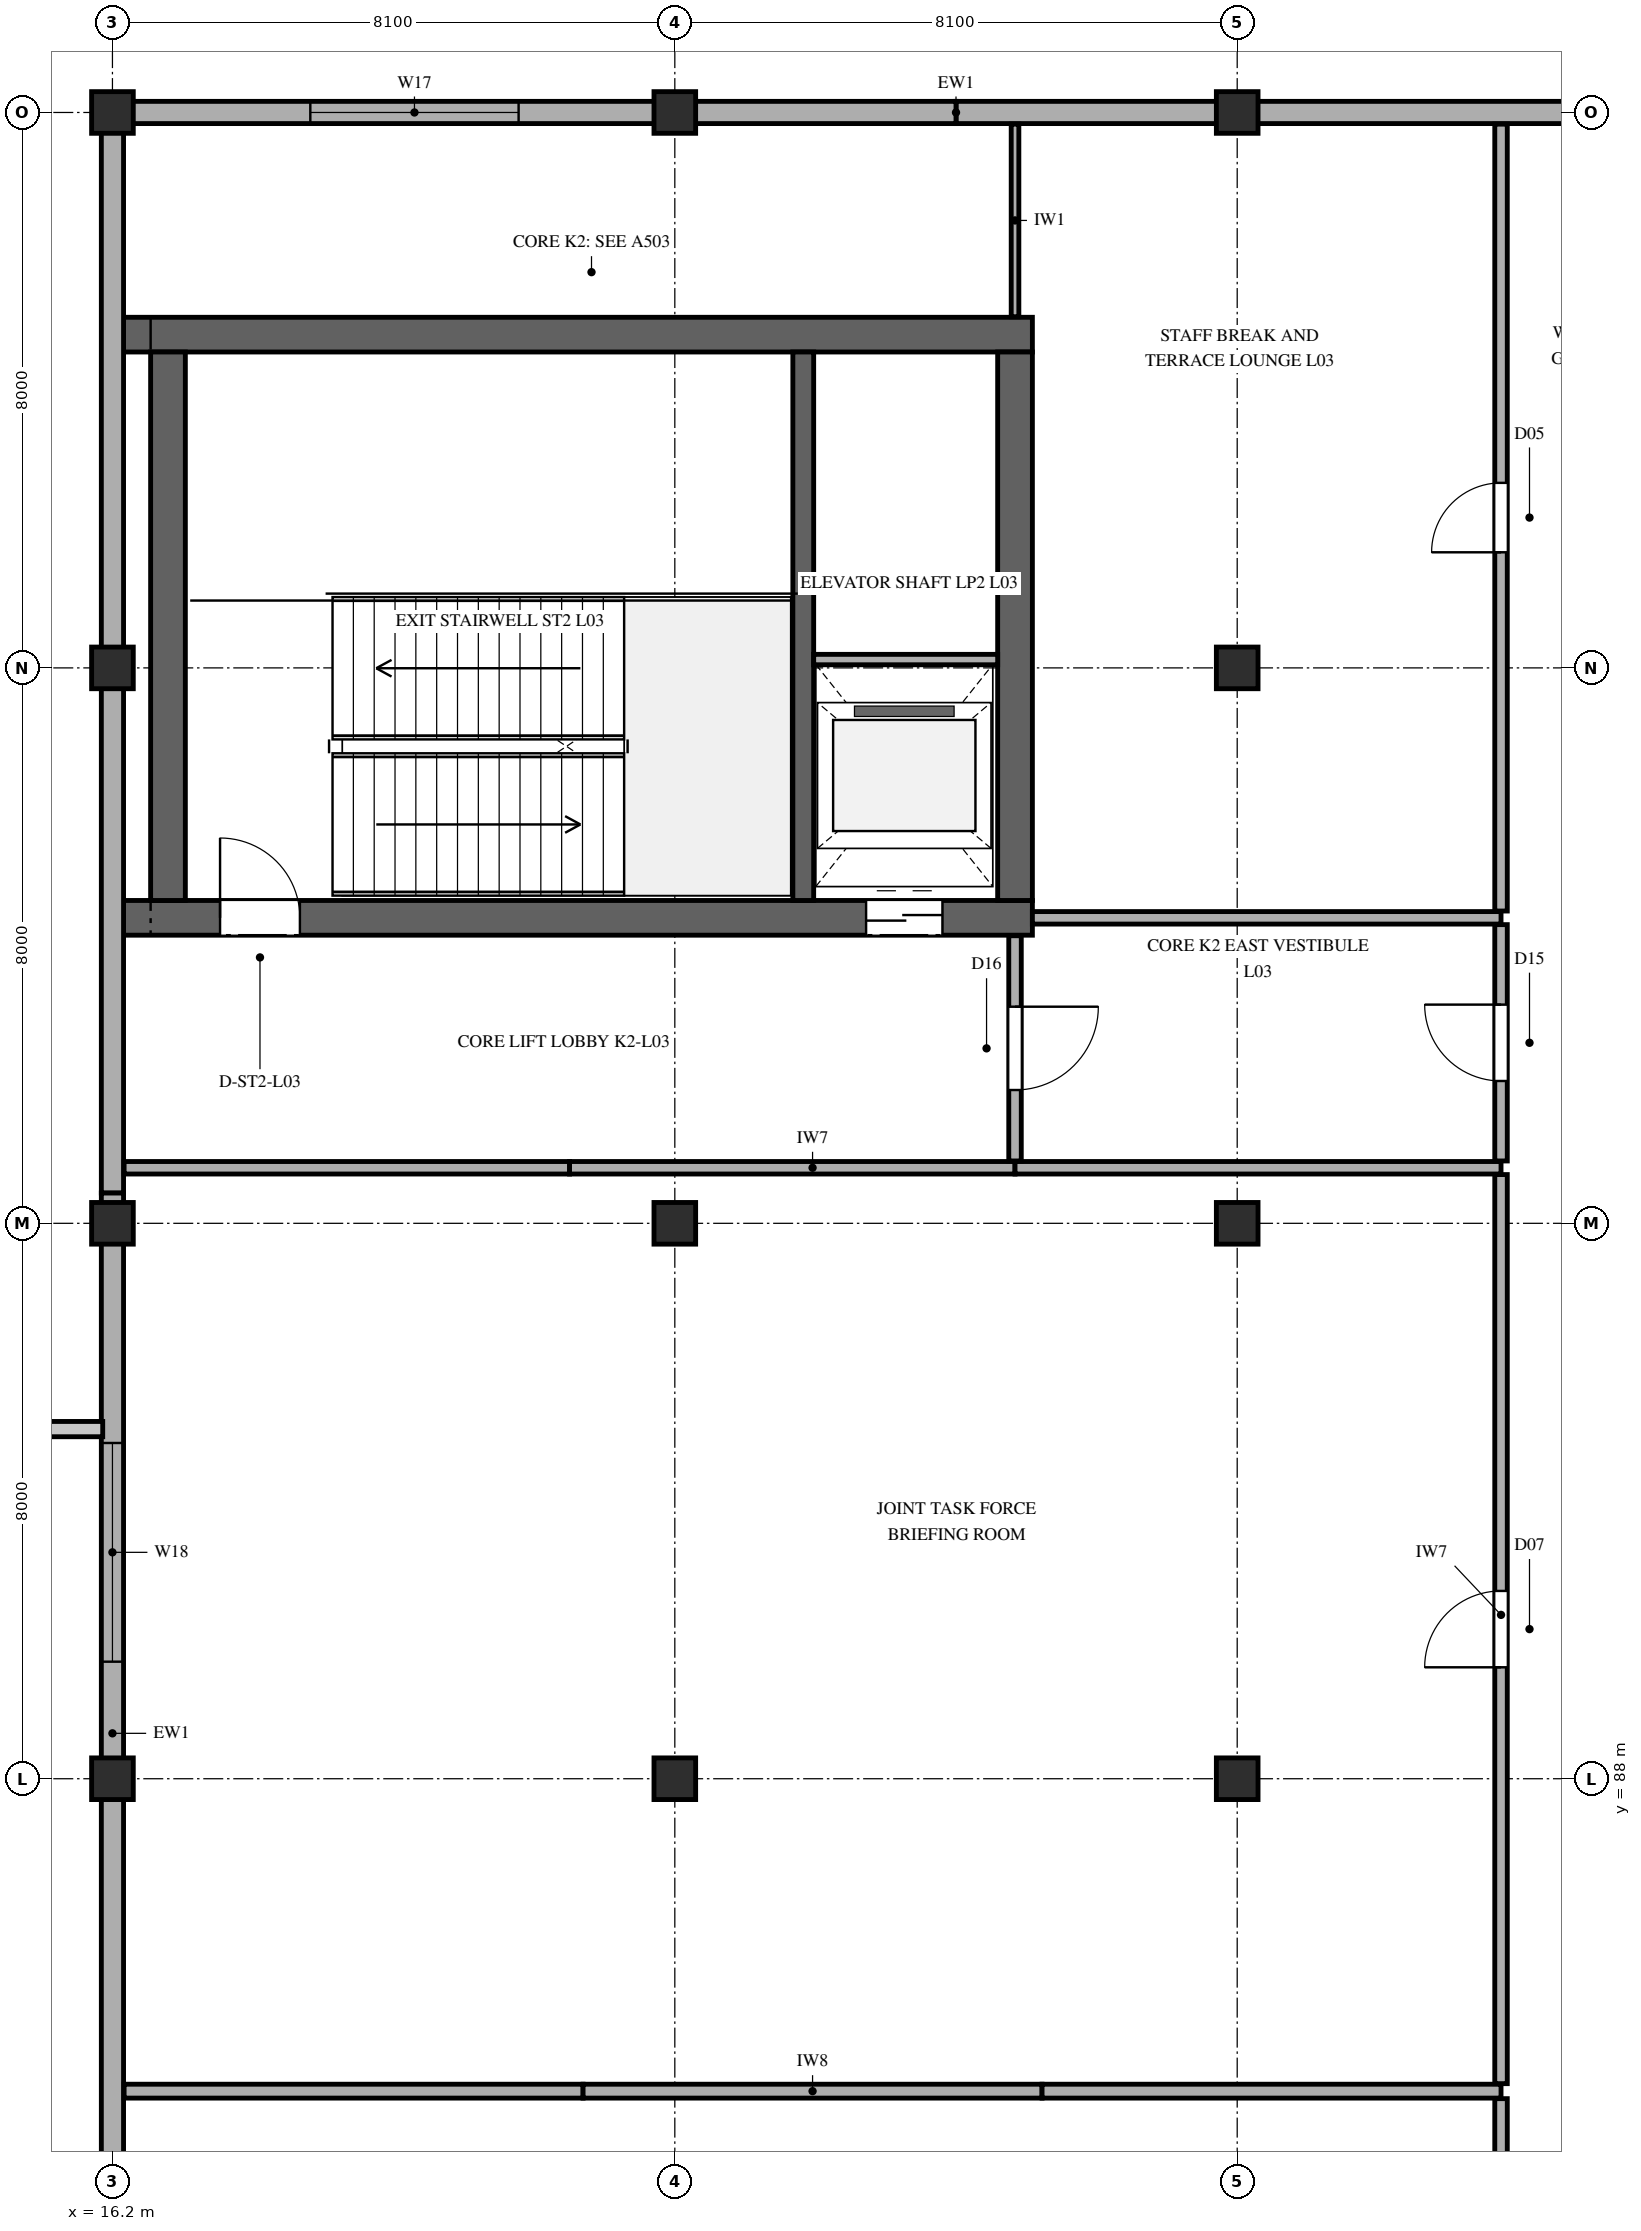
"""IFC4 building model, lengths in metres.
Left out: names, types, materials, properties, quantities, classifications, styles, units other than length and angle.
Written with IfcOpenShell. Run it as: python <this file> out.ifc"""

import sys

from ifc_helpers import new_model, si_unit, direction, frame, frame_2d, origin, origin_2d, place, context, subcontext, project, spatial, rectangle, extrude, element, fill, save


model = new_model("IFC4")
c1 = context("Model", 3, precision=1e-05, world=origin(), true_north=direction((0.0, 1.0)))
c2 = subcontext(c1, "Body", "Model", "MODEL_VIEW")
j1 = project(units=[si_unit("LENGTHUNIT", "METRE"), si_unit("PLANEANGLEUNIT", "RADIAN")], contexts=[c1])
p1 = place(None, origin())
s1 = spatial("IfcSite", under=j1, at=p1, CompositionType="ELEMENT")
p2 = place(p1, origin())
s2 = spatial("IfcBuilding", under=s1, at=p2, CompositionType="ELEMENT")
p3 = place(p2, frame((0.0, 0.0, 14.7)))
s3 = spatial("IfcBuildingStorey", under=s2, at=p3, CompositionType="ELEMENT", Elevation=14.7)
p4 = place(p3, frame((16.36, 100.4, 0.0), z_axis=(0.0, 0.0, 1.0), x_axis=(1.0, 0.0, 0.0)))
e1 = element("IfcWall", 1, at=p4, inside=s3, PredefinedType="SHEAR", context=c2, shape_type="SweptSolid", body=[
    extrude(rectangle(XDim=13.09, YDim=0.5, at=frame_2d((6.545, 0.0))), origin(), (0.0, 0.0, 1.0), 5.1),
])
p5 = place(p4, frame((1.39, 0.0, 0.0)))
e2 = element("IfcOpeningElement", 2, at=p5, cuts=e1, PredefinedType="OPENING", context=c2, shape_type="SweptSolid", body=[
    extrude(rectangle(XDim=1.15, YDim=2.25, at=frame_2d((0.575, 1.125))), frame((0.0, 0.26, 0.0), z_axis=(0.0, -1.0, 0.0), x_axis=(1.0, 0.0, 0.0)), (0.0, 0.0, 1.0), 0.52),
])
p6 = place(p4, frame((10.695, 0.0, 0.0)))
e3 = element("IfcOpeningElement", 3, at=p6, cuts=e1, PredefinedType="OPENING", context=c2, shape_type="SweptSolid", body=[
    extrude(rectangle(XDim=1.1, YDim=2.2, at=frame_2d((0.55, 1.1))), frame((0.0, 0.26, 0.0), z_axis=(0.0, -1.0, 0.0), x_axis=(1.0, 0.0, 0.0)), (0.0, 0.0, 1.0), 0.52),
])
p7 = place(p3, frame((16.36, 108.8, 0.0), z_axis=(0.0, 0.0, 1.0), x_axis=(1.0, 0.0, 0.0)))
e4 = element("IfcWall", 4, at=p7, inside=s3, PredefinedType="SHEAR", context=c2, shape_type="SweptSolid", body=[
    extrude(rectangle(XDim=13.09, YDim=0.5, at=frame_2d((6.545, 0.0))), origin(), (0.0, 0.0, 1.0), 5.1),
])
for number, where, z_axis, x_axis in (
    (5, (17.0, 100.65, 0.0), (0.0, 0.0, 1.0), (0.0, 1.0, 0.0)),
    (6, (29.2, 100.65, 0.0), (0.0, 0.0, 1.0), (0.0, 1.0, 0.0)),
):
    element("IfcWall", number, at=place(p3, frame(where, z_axis=z_axis, x_axis=x_axis)), inside=s3, PredefinedType="SHEAR", context=c2, shape_type="SweptSolid", body=[
        extrude(rectangle(XDim=7.9, YDim=0.5, at=frame_2d((3.95, 0.0))), origin(), (0.0, 0.0, 1.0), 5.1),
    ])
p8 = place(p3, frame((26.15, 100.65, 0.0), z_axis=(0.0, 0.0, 1.0), x_axis=(0.0, 1.0, 0.0)))
e7 = element("IfcWall", 7, at=p8, inside=s3, PredefinedType="SHEAR", context=c2, shape_type="SweptSolid", body=[
    extrude(rectangle(XDim=7.9, YDim=0.3, at=frame_2d((3.95, 0.0))), origin(), (0.0, 0.0, 1.0), 5.1),
])
for number, where, z_axis, x_axis in (
    (8, (16.2, 88.0, 0.0), (0.0, 0.0, 1.0), (1.0, 0.0, 0.0)),
    (9, (16.2, 96.0, 0.0), (0.0, 0.0, 1.0), (1.0, 0.0, 0.0)),
    (10, (16.2, 104.0, 0.0), (0.0, 0.0, 1.0), (1.0, 0.0, 0.0)),
    (11, (16.2, 112.0, 0.0), (0.0, 0.0, 1.0), (1.0, 0.0, 0.0)),
    (12, (24.3, 88.0, 0.0), (0.0, 0.0, 1.0), (1.0, 0.0, 0.0)),
    (13, (24.3, 96.0, 0.0), (0.0, 0.0, 1.0), (1.0, 0.0, 0.0)),
    (14, (24.3, 112.0, 0.0), (0.0, 0.0, 1.0), (1.0, 0.0, 0.0)),
    (15, (32.4, 88.0, 0.0), (0.0, 0.0, 1.0), (1.0, 0.0, 0.0)),
    (16, (32.4, 96.0, 0.0), (0.0, 0.0, 1.0), (1.0, 0.0, 0.0)),
    (17, (32.4, 104.0, 0.0), (0.0, 0.0, 1.0), (1.0, 0.0, 0.0)),
    (18, (32.4, 112.0, 0.0), (0.0, 0.0, 1.0), (1.0, 0.0, 0.0)),
):
    element("IfcColumn", number, at=place(p3, frame(where, z_axis=z_axis, x_axis=x_axis)), inside=s3, PredefinedType="COLUMN", context=c2, shape_type="SweptSolid", body=[
        extrude(rectangle(XDim=0.6, YDim=0.6, at=origin_2d()), origin(), (0.0, 0.0, 1.0), 5.1),
    ])
p9 = place(p3, frame((40.5, 112.0, 0.0), z_axis=(0.0, 0.0, 1.0), x_axis=(-1.0, 0.0, 0.0)))
e19 = element("IfcWall", 19, at=p9, inside=s3, PredefinedType="SOLIDWALL", context=c2, shape_type="SweptSolid", body=[
    extrude(rectangle(XDim=12.15, YDim=0.32, at=frame_2d((6.075, 0.0))), origin(), (0.0, 0.0, 1.0), 4.232),
])
p10 = place(p3, frame((28.35, 112.0, 0.0), z_axis=(0.0, 0.0, 1.0), x_axis=(-1.0, 0.0, 0.0)))
e20 = element("IfcWall", 20, at=p10, inside=s3, PredefinedType="SOLIDWALL", context=c2, shape_type="SweptSolid", body=[
    extrude(rectangle(XDim=12.15, YDim=0.32, at=frame_2d((6.075, 0.0))), origin(), (0.0, 0.0, 1.0), 4.232),
])
p11 = place(p10, frame((6.3, 0.0, 0.95)))
e21 = element("IfcOpeningElement", 21, at=p11, cuts=e20, PredefinedType="OPENING", context=c2, shape_type="SweptSolid", body=[
    extrude(rectangle(XDim=3.0, YDim=1.8, at=frame_2d((1.5, 0.9))), frame((0.0, 0.17, 0.0), z_axis=(0.0, -1.0, 0.0), x_axis=(1.0, 0.0, 0.0)), (0.0, 0.0, 1.0), 0.34),
])
p12 = place(p3, frame((16.2, 112.0, 0.0), z_axis=(0.0, 0.0, 1.0), x_axis=(0.0, -1.0, 0.0)))
e22 = element("IfcWall", 22, at=p12, inside=s3, PredefinedType="SOLIDWALL", context=c2, shape_type="SweptSolid", body=[
    extrude(rectangle(XDim=15.564, YDim=0.32, at=frame_2d((7.782, 0.0))), origin(), (0.0, 0.0, 1.0), 4.369),
])
p13 = place(p3, frame((16.2, 96.436, 0.0), z_axis=(0.0, 0.0, 1.0), x_axis=(0.0, -1.0, 0.0)))
e23 = element("IfcWall", 23, at=p13, inside=s3, PredefinedType="SOLIDWALL", context=c2, shape_type="SweptSolid", body=[
    extrude(rectangle(XDim=15.564, YDim=0.32, at=frame_2d((7.782, 0.0))), origin(), (0.0, 0.0, 1.0), 4.332),
])
p14 = place(p13, frame((3.6, 0.0, 0.95)))
e24 = element("IfcOpeningElement", 24, at=p14, cuts=e23, PredefinedType="OPENING", context=c2, shape_type="SweptSolid", body=[
    extrude(rectangle(XDim=3.15, YDim=1.6, at=frame_2d((1.575, 0.8))), frame((0.0, 0.17, 0.0), z_axis=(0.0, -1.0, 0.0), x_axis=(1.0, 0.0, 0.0)), (0.0, 0.0, 1.0), 0.34),
])
p15 = place(p3, frame((26.3, 104.12, 0.0), z_axis=(0.0, 0.0, 1.0), x_axis=(1.0, 0.0, 0.0)))
e25 = element("IfcWall", 25, at=p15, inside=s3, PredefinedType="PARTITIONING", context=c2, shape_type="SweptSolid", body=[
    extrude(rectangle(XDim=2.65, YDim=0.15, at=frame_2d((1.325, 0.0))), origin(), (0.0, 0.0, 1.0), 4.84),
])
p16 = place(p3, frame((16.368, 83.5, 0.0), z_axis=(0.0, 0.0, 1.0), x_axis=(1.0, 0.0, 0.0)))
e26 = element("IfcWall", 26, at=p16, inside=s3, PredefinedType="PARTITIONING", context=c2, shape_type="SweptSolid", body=[
    extrude(rectangle(XDim=6.611, YDim=0.2, at=frame_2d((3.305, 0.0))), origin(), (0.0, 0.0, 1.0), 4.84),
])
for number, where, z_axis, x_axis in (
    (27, (22.979, 83.5, 0.0), (0.0, 0.0, 1.0), (1.0, 0.0, 0.0)),
    (28, (29.589, 83.5, 0.0), (0.0, 0.0, 1.0), (1.0, 0.0, 0.0)),
):
    element("IfcWall", number, at=place(p3, frame(where, z_axis=z_axis, x_axis=x_axis)), inside=s3, PredefinedType="PARTITIONING", context=c2, shape_type="SweptSolid", body=[
        extrude(rectangle(XDim=6.611, YDim=0.2, at=frame_2d((3.305, 0.0))), origin(), (0.0, 0.0, 1.0), 4.84),
    ])
for number, where, z_axis, x_axis in (
    (29, (16.368, 96.8, 0.0), (0.0, 0.0, 1.0), (1.0, 0.0, 0.0)),
    (30, (22.784, 96.8, 0.0), (0.0, 0.0, 1.0), (1.0, 0.0, 0.0)),
):
    element("IfcWall", number, at=place(p3, frame(where, z_axis=z_axis, x_axis=x_axis)), inside=s3, PredefinedType="PARTITIONING", context=c2, shape_type="SweptSolid", body=[
        extrude(rectangle(XDim=6.416, YDim=0.18, at=frame_2d((3.208, 0.0))), origin(), (0.0, 0.0, 1.0), 4.84),
    ])
p17 = place(p3, frame((29.2, 96.8, 0.0), z_axis=(0.0, 0.0, 1.0), x_axis=(1.0, 0.0, 0.0)))
e31 = element("IfcWall", 31, at=p17, inside=s3, PredefinedType="PARTITIONING", context=c2, shape_type="SweptSolid", body=[
    extrude(rectangle(XDim=7.0, YDim=0.18, at=frame_2d((3.5, 0.0))), origin(), (0.0, 0.0, 1.0), 4.84),
])
p18 = place(p3, frame((29.45, 100.4, 0.0), z_axis=(0.0, 0.0, 1.0), x_axis=(1.0, 0.0, 0.0)))
e32 = element("IfcWall", 32, at=p18, inside=s3, PredefinedType="PARTITIONING", context=c2, shape_type="SweptSolid", body=[
    extrude(rectangle(XDim=6.75, YDim=0.18, at=frame_2d((3.375, 0.0))), origin(), (0.0, 0.0, 1.0), 4.84),
])
p19 = place(p3, frame((29.2, 96.898, 0.0), z_axis=(0.0, 0.0, 1.0), x_axis=(0.0, 1.0, 0.0)))
e33 = element("IfcWall", 33, at=p19, inside=s3, PredefinedType="PARTITIONING", context=c2, shape_type="SweptSolid", body=[
    extrude(rectangle(XDim=3.244, YDim=0.18, at=frame_2d((1.622, 0.0))), origin(), (0.0, 0.0, 1.0), 4.84),
])
p20 = place(p19, frame((1.022, 0.0, 0.0)))
e34 = element("IfcOpeningElement", 34, at=p20, cuts=e33, PredefinedType="OPENING", context=c2, shape_type="SweptSolid", body=[
    extrude(rectangle(XDim=1.2, YDim=2.2, at=frame_2d((0.6, 1.1))), frame((0.0, 0.1, 0.0), z_axis=(0.0, -1.0, 0.0), x_axis=(1.0, 0.0, 0.0)), (0.0, 0.0, 1.0), 0.2),
])
p21 = place(p3, frame((29.2, 109.058, 0.0), z_axis=(0.0, 0.0, 1.0), x_axis=(0.0, 1.0, 0.0)))
e35 = element("IfcWall", 35, at=p21, inside=s3, PredefinedType="PARTITIONING", context=c2, shape_type="SweptSolid", body=[
    extrude(rectangle(XDim=2.774, YDim=0.11, at=frame_2d((1.387, 0.0))), origin(), (0.0, 0.0, 1.0), 4.84),
])
p22 = place(p3, frame((36.2, 68.888, 0.0), z_axis=(0.0, 0.0, 1.0), x_axis=(0.0, 1.0, 0.0)))
e36 = element("IfcWall", 36, at=p22, inside=s3, PredefinedType="PARTITIONING", context=c2, shape_type="SweptSolid", body=[
    extrude(rectangle(XDim=14.504, YDim=0.18, at=frame_2d((7.252, 0.0))), origin(), (0.0, 0.0, 1.0), 4.529),
])
p23 = place(p22, frame((6.702, 0.0, 0.0)))
e37 = element("IfcOpeningElement", 37, at=p23, cuts=e36, PredefinedType="OPENING", context=c2, shape_type="SweptSolid", body=[
    extrude(rectangle(XDim=1.1, YDim=2.2, at=frame_2d((0.55, 1.1))), frame((0.0, 0.1, 0.0), z_axis=(0.0, -1.0, 0.0), x_axis=(1.0, 0.0, 0.0)), (0.0, 0.0, 1.0), 0.2),
])
p24 = place(p3, frame((36.2, 83.608, 0.0), z_axis=(0.0, 0.0, 1.0), x_axis=(0.0, 1.0, 0.0)))
e38 = element("IfcWall", 38, at=p24, inside=s3, PredefinedType="PARTITIONING", context=c2, shape_type="SweptSolid", body=[
    extrude(rectangle(XDim=13.094, YDim=0.18, at=frame_2d((6.547, 0.0))), origin(), (0.0, 0.0, 1.0), 4.478),
])
p25 = place(p24, frame((5.997, 0.0, 0.0)))
e39 = element("IfcOpeningElement", 39, at=p25, cuts=e38, PredefinedType="OPENING", context=c2, shape_type="SweptSolid", body=[
    extrude(rectangle(XDim=1.1, YDim=2.2, at=frame_2d((0.55, 1.1))), frame((0.0, 0.1, 0.0), z_axis=(0.0, -1.0, 0.0), x_axis=(1.0, 0.0, 0.0)), (0.0, 0.0, 1.0), 0.2),
])
p26 = place(p3, frame((36.2, 96.898, 0.0), z_axis=(0.0, 0.0, 1.0), x_axis=(0.0, 1.0, 0.0)))
e40 = element("IfcWall", 40, at=p26, inside=s3, PredefinedType="PARTITIONING", context=c2, shape_type="SweptSolid", body=[
    extrude(rectangle(XDim=3.404, YDim=0.18, at=frame_2d((1.702, 0.0))), origin(), (0.0, 0.0, 1.0), 4.478),
])
p27 = place(p26, frame((1.152, 0.0, 0.0)))
e41 = element("IfcOpeningElement", 41, at=p27, cuts=e40, PredefinedType="OPENING", context=c2, shape_type="SweptSolid", body=[
    extrude(rectangle(XDim=1.1, YDim=2.2, at=frame_2d((0.55, 1.1))), frame((0.0, 0.1, 0.0), z_axis=(0.0, -1.0, 0.0), x_axis=(1.0, 0.0, 0.0)), (0.0, 0.0, 1.0), 0.2),
])
p28 = place(p3, frame((36.2, 100.498, 0.0), z_axis=(0.0, 0.0, 1.0), x_axis=(0.0, 1.0, 0.0)))
e42 = element("IfcWall", 42, at=p28, inside=s3, PredefinedType="PARTITIONING", context=c2, shape_type="SweptSolid", body=[
    extrude(rectangle(XDim=11.334, YDim=0.18, at=frame_2d((5.667, 0.0))), origin(), (0.0, 0.0, 1.0), 4.478),
])
p29 = place(p28, frame((5.167, 0.0, 0.0)))
e43 = element("IfcOpeningElement", 43, at=p29, cuts=e42, PredefinedType="OPENING", context=c2, shape_type="SweptSolid", body=[
    extrude(rectangle(XDim=1.0, YDim=2.2, at=frame_2d((0.5, 1.1))), frame((0.0, 0.1, 0.0), z_axis=(0.0, -1.0, 0.0), x_axis=(1.0, 0.0, 0.0)), (0.0, 0.0, 1.0), 0.2),
])
p30 = place(p11, origin())
e44 = element("IfcWindow", 44, at=p30, inside=s3, PartitioningType="TRIPLE_PANEL_VERTICAL", PredefinedType="WINDOW", context=c2, shape_type="SweptSolid", body=[
    extrude(rectangle(XDim=3.0, YDim=1.8, at=frame_2d((1.5, 0.9))), frame((0.0, 0.03, 0.0), z_axis=(0.0, -1.0, 0.0), x_axis=(1.0, 0.0, 0.0)), (0.0, 0.0, 1.0), 0.06),
])
fill(e21, e44)
p31 = place(p14, origin())
e45 = element("IfcWindow", 45, at=p31, inside=s3, PartitioningType="TRIPLE_PANEL_VERTICAL", PredefinedType="WINDOW", context=c2, shape_type="SweptSolid", body=[
    extrude(rectangle(XDim=3.15, YDim=1.6, at=frame_2d((1.575, 0.8))), frame((0.0, 0.03, 0.0), z_axis=(0.0, -1.0, 0.0), x_axis=(1.0, 0.0, 0.0)), (0.0, 0.0, 1.0), 0.06),
])
fill(e24, e45)
p32 = place(p5, origin())
e46 = element("IfcDoor", 46, at=p32, inside=s3, OperationType="SINGLE_SWING_LEFT", PredefinedType="DOOR", context=c2, shape_type="SweptSolid", body=[
    extrude(rectangle(XDim=1.15, YDim=2.25, at=frame_2d((0.575, 1.125))), frame((0.0, 0.025, 0.0), z_axis=(0.0, -1.0, 0.0), x_axis=(1.0, 0.0, 0.0)), (0.0, 0.0, 1.0), 0.05),
])
fill(e2, e46)
p33 = place(p6, frame((1.1, 0.0, 0.0), z_axis=(0.0, 0.0, 1.0), x_axis=(-1.0, 0.0, 0.0)))
e47 = element("IfcDoor", 47, at=p33, inside=s3, OperationType="DOUBLE_DOOR_SLIDING", PredefinedType="DOOR", context=c2, shape_type="SweptSolid", body=[
    extrude(rectangle(XDim=1.1, YDim=2.2, at=frame_2d((0.55, 1.1))), frame((0.0, 0.025, 0.0), z_axis=(0.0, -1.0, 0.0), x_axis=(1.0, 0.0, 0.0)), (0.0, 0.0, 1.0), 0.05),
])
fill(e3, e47)
p34 = place(p20, frame((1.2, 0.0, 0.0), z_axis=(0.0, 0.0, 1.0), x_axis=(-1.0, 0.0, 0.0)))
e48 = element("IfcDoor", 48, at=p34, inside=s3, OperationType="SINGLE_SWING_RIGHT", PredefinedType="DOOR", context=c2, shape_type="SweptSolid", body=[
    extrude(rectangle(XDim=1.2, YDim=2.2, at=frame_2d((0.6, 1.1))), frame((0.0, 0.025, 0.0), z_axis=(0.0, -1.0, 0.0), x_axis=(1.0, 0.0, 0.0)), (0.0, 0.0, 1.0), 0.05),
])
fill(e34, e48)
p35 = place(p25, origin())
e49 = element("IfcDoor", 49, at=p35, inside=s3, OperationType="SINGLE_SWING_LEFT", PredefinedType="DOOR", context=c2, shape_type="SweptSolid", body=[
    extrude(rectangle(XDim=1.1, YDim=2.2, at=frame_2d((0.55, 1.1))), frame((0.0, 0.025, 0.0), z_axis=(0.0, -1.0, 0.0), x_axis=(1.0, 0.0, 0.0)), (0.0, 0.0, 1.0), 0.05),
])
fill(e39, e49)
p36 = place(p27, origin())
e50 = element("IfcDoor", 50, at=p36, inside=s3, OperationType="SINGLE_SWING_RIGHT", PredefinedType="DOOR", context=c2, shape_type="SweptSolid", body=[
    extrude(rectangle(XDim=1.1, YDim=2.2, at=frame_2d((0.55, 1.1))), frame((0.0, 0.025, 0.0), z_axis=(0.0, -1.0, 0.0), x_axis=(1.0, 0.0, 0.0)), (0.0, 0.0, 1.0), 0.05),
])
fill(e41, e50)
p37 = place(p29, origin())
e51 = element("IfcDoor", 51, at=p37, inside=s3, OperationType="SINGLE_SWING_LEFT", PredefinedType="DOOR", context=c2, shape_type="SweptSolid", body=[
    extrude(rectangle(XDim=1.0, YDim=2.2, at=frame_2d((0.5, 1.1))), frame((0.0, 0.025, 0.0), z_axis=(0.0, -1.0, 0.0), x_axis=(1.0, 0.0, 0.0)), (0.0, 0.0, 1.0), 0.05),
])
fill(e43, e51)
save(model, sys.argv[1])
